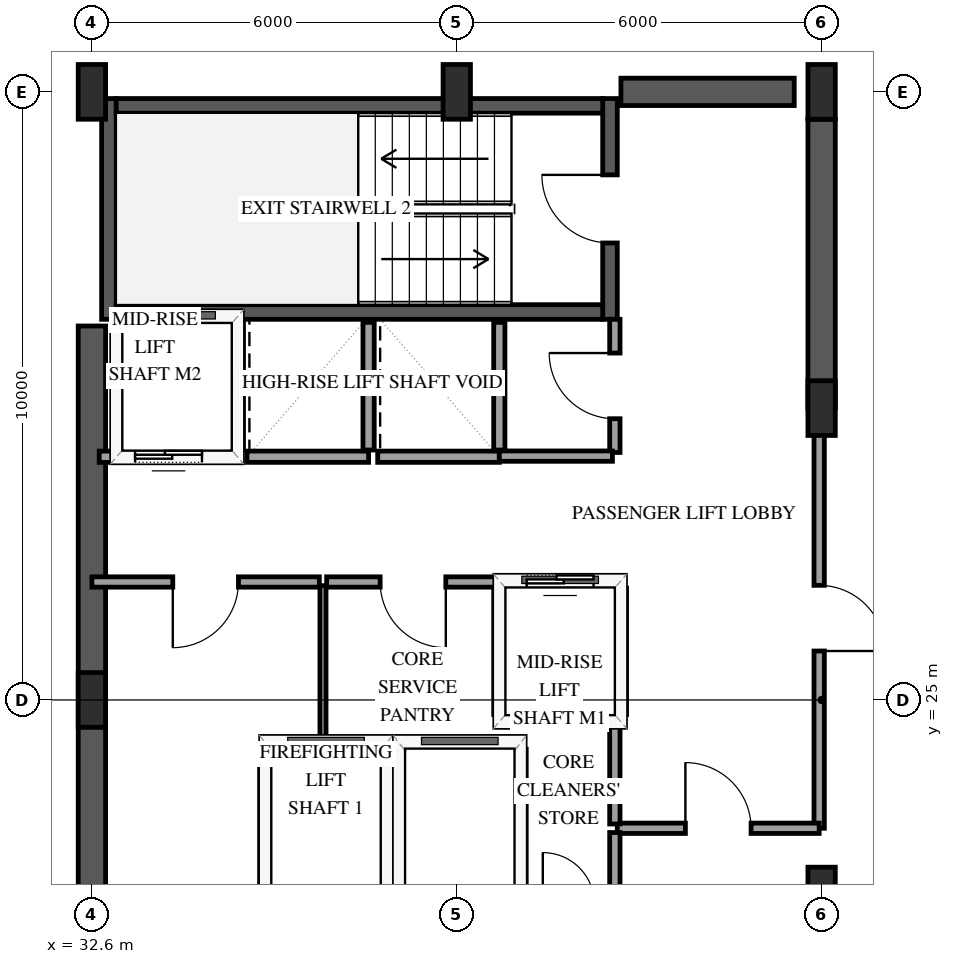
"""IFC4 building model, lengths in metres.
Left out: names, types, materials, properties, quantities, classifications, styles, units other than length and angle.
Written with IfcOpenShell. Run it as: python <this file> out.ifc"""

import sys

from ifc_helpers import new_model, si_unit, direction, frame, frame_2d, origin, origin_2d, place, context, subcontext, project, spatial, rectangle, extrude, element, fill, save


model = new_model("IFC4")
c1 = context("Model", 3, precision=1e-05, world=origin(), true_north=direction((0.0, 1.0)))
c2 = subcontext(c1, "Body", "Model", "MODEL_VIEW")
j1 = project(units=[si_unit("LENGTHUNIT", "METRE"), si_unit("PLANEANGLEUNIT", "RADIAN")], contexts=[c1])
p1 = place(None, origin())
s1 = spatial("IfcSite", under=j1, at=p1, CompositionType="ELEMENT")
p2 = place(p1, origin())
s2 = spatial("IfcBuilding", under=s1, at=p2, CompositionType="ELEMENT")
p3 = place(p2, frame((0.0, 0.0, 194.2)))
s3 = spatial("IfcBuildingStorey", under=s2, at=p3, CompositionType="ELEMENT", Elevation=194.2)
p4 = place(p3, frame((32.88, 31.26, 0.0), z_axis=(0.0, 0.0, 1.0), x_axis=(0.0, 1.0, 0.0)))
e1 = element("IfcWall", 1, at=p4, inside=s3, PredefinedType="SHEAR", context=c2, shape_type="SweptSolid", body=[
    extrude(rectangle(XDim=3.63, YDim=0.24, at=frame_2d((1.815, 0.0))), origin(), (0.0, 0.0, 1.0), 3.6),
])
p5 = place(p3, frame((41.12, 31.26, 0.0), z_axis=(0.0, 0.0, 1.0), x_axis=(0.0, 1.0, 0.0)))
e2 = element("IfcWall", 2, at=p5, inside=s3, PredefinedType="SHEAR", context=c2, shape_type="SweptSolid", body=[
    extrude(rectangle(XDim=3.63, YDim=0.24, at=frame_2d((1.815, 0.0))), origin(), (0.0, 0.0, 1.0), 3.6),
])
p6 = place(p5, frame((1.255, 0.0, 0.0)))
e3 = element("IfcOpeningElement", 3, at=p6, cuts=e2, PredefinedType="OPENING", context=c2, shape_type="SweptSolid", body=[
    extrude(rectangle(XDim=1.12, YDim=2.15, at=frame_2d((0.56, 1.075))), frame((0.0, 0.13, 0.0), z_axis=(0.0, -1.0, 0.0), x_axis=(1.0, 0.0, 0.0)), (0.0, 0.0, 1.0), 0.26),
])
for number, where, z_axis, x_axis in (
    (4, (33.0, 31.38, 0.0), (0.0, 0.0, 1.0), (1.0, 0.0, 0.0)),
    (5, (33.0, 34.77, 0.0), (0.0, 0.0, 1.0), (1.0, 0.0, 0.0)),
):
    element("IfcWall", number, at=place(p3, frame(where, z_axis=z_axis, x_axis=x_axis)), inside=s3, PredefinedType="SHEAR", context=c2, shape_type="SweptSolid", body=[
        extrude(rectangle(XDim=8.0, YDim=0.24, at=frame_2d((4.0, 0.0))), origin(), (0.0, 0.0, 1.0), 3.6),
    ])
p7 = place(p3, frame((32.6, 18.85, 0.0), z_axis=(0.0, 0.0, 1.0), x_axis=(0.0, 1.0, 0.0)))
e6 = element("IfcWall", 6, at=p7, inside=s3, PredefinedType="SHEAR", context=c2, shape_type="SweptSolid", body=[
    extrude(rectangle(XDim=12.3, YDim=0.45, at=frame_2d((6.15, 0.0))), origin(), (0.0, 0.0, 1.0), 3.6),
])
p8 = place(p3, frame((41.3, 35.0, 0.0), z_axis=(0.0, 0.0, 1.0), x_axis=(1.0, 0.0, 0.0)))
e7 = element("IfcWall", 7, at=p8, inside=s3, PredefinedType="SHEAR", context=c2, shape_type="SweptSolid", body=[
    extrude(rectangle(XDim=2.85, YDim=0.45, at=frame_2d((1.425, 0.0))), origin(), (0.0, 0.0, 1.0), 3.6),
])
p9 = place(p3, frame((44.6, 29.8, 0.0), z_axis=(0.0, 0.0, 1.0), x_axis=(0.0, 1.0, 0.0)))
e8 = element("IfcWall", 8, at=p9, inside=s3, PredefinedType="SHEAR", context=c2, shape_type="SweptSolid", body=[
    extrude(rectangle(XDim=4.75, YDim=0.45, at=frame_2d((2.375, 0.0))), origin(), (0.0, 0.0, 1.0), 3.6),
])
for number, where, z_axis, x_axis in (
    (9, (32.6, 25.0, 0.0), (0.0, 0.0, 1.0), (1.0, 0.0, 0.0)),
    (10, (32.6, 35.0, 0.0), (0.0, 0.0, 1.0), (1.0, 0.0, 0.0)),
    (11, (38.6, 35.0, 0.0), (0.0, 0.0, 1.0), (1.0, 0.0, 0.0)),
    (12, (44.6, 21.8, 0.0), (0.0, 0.0, 1.0), (1.0, 0.0, 0.0)),
    (13, (44.6, 29.8, 0.0), (0.0, 0.0, 1.0), (1.0, 0.0, 0.0)),
    (14, (44.6, 35.0, 0.0), (0.0, 0.0, 1.0), (1.0, 0.0, 0.0)),
):
    element("IfcColumn", number, at=place(p3, frame(where, z_axis=z_axis, x_axis=x_axis)), inside=s3, PredefinedType="PILASTER", context=c2, shape_type="SweptSolid", body=[
        extrude(rectangle(XDim=0.45, YDim=0.9, at=origin_2d()), origin(), (0.0, 0.0, 1.0), 3.6),
    ])
p10 = place(p3, frame((35.45, 24.3, 0.0), z_axis=(0.0, 0.0, 1.0), x_axis=(1.0, 0.0, 0.0)))
e15 = element("IfcWall", 15, at=p10, inside=s3, PredefinedType="SOLIDWALL", context=c2, shape_type="SweptSolid", body=[
    extrude(rectangle(XDim=2.0, YDim=0.185, at=frame_2d((1.0, 0.0))), origin(), (0.0, 0.0, 1.0), 3.3),
])
for number, where, z_axis, x_axis in (
    (16, (35.45, 21.81, 0.0), (0.0, 0.0, 1.0), (0.0, 1.0, 0.0)),
    (17, (37.45, 21.81, 0.0), (0.0, 0.0, 1.0), (0.0, 1.0, 0.0)),
):
    element("IfcWall", number, at=place(p3, frame(where, z_axis=z_axis, x_axis=x_axis)), inside=s3, PredefinedType="SOLIDWALL", context=c2, shape_type="SweptSolid", body=[
        extrude(rectangle(XDim=2.38, YDim=0.185, at=frame_2d((1.19, 0.0))), origin(), (0.0, 0.0, 1.0), 3.3),
    ])
p11 = place(p3, frame((37.65, 24.3, 0.0), z_axis=(0.0, 0.0, 1.0), x_axis=(1.0, 0.0, 0.0)))
e18 = element("IfcWall", 18, at=p11, inside=s3, PredefinedType="SOLIDWALL", context=c2, shape_type="SweptSolid", body=[
    extrude(rectangle(XDim=2.0, YDim=0.185, at=frame_2d((1.0, 0.0))), origin(), (0.0, 0.0, 1.0), 3.3),
])
p12 = place(p3, frame((39.65, 21.81, 0.0), z_axis=(0.0, 0.0, 1.0), x_axis=(0.0, 1.0, 0.0)))
e19 = element("IfcWall", 19, at=p12, inside=s3, PredefinedType="SOLIDWALL", context=c2, shape_type="SweptSolid", body=[
    extrude(rectangle(XDim=2.38, YDim=0.185, at=frame_2d((1.19, 0.0))), origin(), (0.0, 0.0, 1.0), 3.3),
])
p13 = place(p3, frame((39.3, 24.65, 0.0), z_axis=(0.0, 0.0, 1.0), x_axis=(1.0, 0.0, 0.0)))
e20 = element("IfcWall", 20, at=p13, inside=s3, PredefinedType="SOLIDWALL", context=c2, shape_type="SweptSolid", body=[
    extrude(rectangle(XDim=2.0, YDim=0.185, at=frame_2d((1.0, 0.0))), origin(), (0.0, 0.0, 1.0), 3.3),
])
p14 = place(p3, frame((39.3, 26.95, 0.0), z_axis=(0.0, 0.0, 1.0), x_axis=(1.0, 0.0, 0.0)))
e21 = element("IfcWall", 21, at=p14, inside=s3, PredefinedType="SOLIDWALL", context=c2, shape_type="SweptSolid", body=[
    extrude(rectangle(XDim=2.0, YDim=0.185, at=frame_2d((1.0, 0.0))), origin(), (0.0, 0.0, 1.0), 3.3),
])
p15 = place(p14, frame((0.45, 0.0, 0.0)))
e22 = element("IfcOpeningElement", 22, at=p15, cuts=e21, PredefinedType="OPENING", context=c2, shape_type="SweptSolid", body=[
    extrude(rectangle(XDim=1.1, YDim=2.15, at=frame_2d((0.55, 1.075))), frame((0.0, 0.103, 0.0), z_axis=(0.0, -1.0, 0.0), x_axis=(1.0, 0.0, 0.0)), (0.0, 0.0, 1.0), 0.205),
])
for number, where, z_axis, x_axis in (
    (23, (39.3, 24.76, 0.0), (0.0, 0.0, 1.0), (0.0, 1.0, 0.0)),
    (24, (41.3, 24.76, 0.0), (0.0, 0.0, 1.0), (0.0, 1.0, 0.0)),
):
    element("IfcWall", number, at=place(p3, frame(where, z_axis=z_axis, x_axis=x_axis)), inside=s3, PredefinedType="SOLIDWALL", context=c2, shape_type="SweptSolid", body=[
        extrude(rectangle(XDim=2.08, YDim=0.185, at=frame_2d((1.04, 0.0))), origin(), (0.0, 0.0, 1.0), 3.3),
    ])
p16 = place(p3, frame((32.72, 29.0, 0.0), z_axis=(0.0, 0.0, 1.0), x_axis=(1.0, 0.0, 0.0)))
e25 = element("IfcWall", 25, at=p16, inside=s3, PredefinedType="SOLIDWALL", context=c2, shape_type="SweptSolid", body=[
    extrude(rectangle(XDim=2.28, YDim=0.185, at=frame_2d((1.14, 0.0))), origin(), (0.0, 0.0, 1.0), 3.3),
])
p17 = place(p16, frame((0.59, 0.0, 0.0)))
e26 = element("IfcOpeningElement", 26, at=p17, cuts=e25, PredefinedType="OPENING", context=c2, shape_type="SweptSolid", body=[
    extrude(rectangle(XDim=1.1, YDim=2.15, at=frame_2d((0.55, 1.075))), frame((0.0, 0.103, 0.0), z_axis=(0.0, -1.0, 0.0), x_axis=(1.0, 0.0, 0.0)), (0.0, 0.0, 1.0), 0.205),
])
p18 = place(p3, frame((35.0, 29.11, 0.0), z_axis=(0.0, 0.0, 1.0), x_axis=(0.0, 1.0, 0.0)))
e27 = element("IfcWall", 27, at=p18, inside=s3, PredefinedType="SOLIDWALL", context=c2, shape_type="SweptSolid", body=[
    extrude(rectangle(XDim=2.1, YDim=0.185, at=frame_2d((1.05, 0.0))), origin(), (0.0, 0.0, 1.0), 3.3),
])
p19 = place(p3, frame((35.15, 29.0, 0.0), z_axis=(0.0, 0.0, 1.0), x_axis=(1.0, 0.0, 0.0)))
e28 = element("IfcWall", 28, at=p19, inside=s3, PredefinedType="SOLIDWALL", context=c2, shape_type="SweptSolid", body=[
    extrude(rectangle(XDim=2.0, YDim=0.185, at=frame_2d((1.0, 0.0))), origin(), (0.0, 0.0, 1.0), 3.3),
])
p20 = place(p3, frame((37.15, 29.11, 0.0), z_axis=(0.0, 0.0, 1.0), x_axis=(0.0, 1.0, 0.0)))
e29 = element("IfcWall", 29, at=p20, inside=s3, PredefinedType="SOLIDWALL", context=c2, shape_type="SweptSolid", body=[
    extrude(rectangle(XDim=2.1, YDim=0.185, at=frame_2d((1.05, 0.0))), origin(), (0.0, 0.0, 1.0), 3.3),
])
p21 = place(p3, frame((37.3, 29.0, 0.0), z_axis=(0.0, 0.0, 1.0), x_axis=(1.0, 0.0, 0.0)))
e30 = element("IfcWall", 30, at=p21, inside=s3, PredefinedType="SOLIDWALL", context=c2, shape_type="SweptSolid", body=[
    extrude(rectangle(XDim=2.0, YDim=0.185, at=frame_2d((1.0, 0.0))), origin(), (0.0, 0.0, 1.0), 3.3),
])
p22 = place(p3, frame((39.3, 29.11, 0.0), z_axis=(0.0, 0.0, 1.0), x_axis=(0.0, 1.0, 0.0)))
e31 = element("IfcWall", 31, at=p22, inside=s3, PredefinedType="SOLIDWALL", context=c2, shape_type="SweptSolid", body=[
    extrude(rectangle(XDim=2.1, YDim=0.185, at=frame_2d((1.05, 0.0))), origin(), (0.0, 0.0, 1.0), 3.3),
])
p23 = place(p3, frame((44.56, 29.8, 0.0), z_axis=(0.0, 0.0, 1.0), x_axis=(0.0, -1.0, 0.0)))
e32 = element("IfcWall", 32, at=p23, inside=s3, PredefinedType="PARTITIONING", context=c2, shape_type="SweptSolid", body=[
    extrude(rectangle(XDim=6.91, YDim=0.17, at=frame_2d((3.455, 0.0))), origin(), (0.0, 0.0, 1.0), 2.34),
])
p24 = place(p23, frame((2.915, 0.0, 0.0)))
e33 = element("IfcOpeningElement", 33, at=p24, cuts=e32, PredefinedType="OPENING", context=c2, shape_type="SweptSolid", body=[
    extrude(rectangle(XDim=1.08, YDim=2.15, at=frame_2d((0.54, 1.075))), frame((0.0, 0.095, 0.0), z_axis=(0.0, -1.0, 0.0), x_axis=(1.0, 0.0, 0.0)), (0.0, 0.0, 1.0), 0.19),
])
p25 = place(p3, frame((36.34, 26.94, 0.0), z_axis=(0.0, 0.0, 1.0), x_axis=(-1.0, 0.0, 0.0)))
e34 = element("IfcWall", 34, at=p25, inside=s3, PredefinedType="PARTITIONING", context=c2, shape_type="SweptSolid", body=[
    extrude(rectangle(XDim=3.74, YDim=0.17, at=frame_2d((1.87, 0.0))), origin(), (0.0, 0.0, 1.0), 3.3),
])
p26 = place(p25, frame((1.33, 0.0, 0.0)))
e35 = element("IfcOpeningElement", 35, at=p26, cuts=e34, PredefinedType="OPENING", context=c2, shape_type="SweptSolid", body=[
    extrude(rectangle(XDim=1.08, YDim=2.15, at=frame_2d((0.54, 1.075))), frame((0.0, 0.095, 0.0), z_axis=(0.0, -1.0, 0.0), x_axis=(1.0, 0.0, 0.0)), (0.0, 0.0, 1.0), 0.19),
])
p27 = place(p3, frame((41.24, 22.89, 0.0), z_axis=(0.0, 0.0, 1.0), x_axis=(1.0, 0.0, 0.0)))
e36 = element("IfcWall", 36, at=p27, inside=s3, PredefinedType="PARTITIONING", context=c2, shape_type="SweptSolid", body=[
    extrude(rectangle(XDim=3.32, YDim=0.17, at=frame_2d((1.66, 0.0))), origin(), (0.0, 0.0, 1.0), 3.3),
])
p28 = place(p27, frame((1.12, 0.0, 0.0)))
e37 = element("IfcOpeningElement", 37, at=p28, cuts=e36, PredefinedType="OPENING", context=c2, shape_type="SweptSolid", body=[
    extrude(rectangle(XDim=1.08, YDim=2.15, at=frame_2d((0.54, 1.075))), frame((0.0, 0.095, 0.0), z_axis=(0.0, -1.0, 0.0), x_axis=(1.0, 0.0, 0.0)), (0.0, 0.0, 1.0), 0.19),
])
p29 = place(p3, frame((39.3, 26.94, 0.0), z_axis=(0.0, 0.0, 1.0), x_axis=(-1.0, 0.0, 0.0)))
e38 = element("IfcWall", 38, at=p29, inside=s3, PredefinedType="PARTITIONING", context=c2, shape_type="SweptSolid", body=[
    extrude(rectangle(XDim=2.84, YDim=0.17, at=frame_2d((1.42, 0.0))), origin(), (0.0, 0.0, 1.0), 3.3),
])
p30 = place(p29, frame((0.88, 0.0, 0.0)))
e39 = element("IfcOpeningElement", 39, at=p30, cuts=e38, PredefinedType="OPENING", context=c2, shape_type="SweptSolid", body=[
    extrude(rectangle(XDim=1.08, YDim=2.15, at=frame_2d((0.54, 1.075))), frame((0.0, 0.095, 0.0), z_axis=(0.0, -1.0, 0.0), x_axis=(1.0, 0.0, 0.0)), (0.0, 0.0, 1.0), 0.19),
])
p31 = place(p3, frame((36.4, 26.88, 0.0), z_axis=(0.0, 0.0, 1.0), x_axis=(0.0, -1.0, 0.0)))
e40 = element("IfcWall", 40, at=p31, inside=s3, PredefinedType="PARTITIONING", context=c2, shape_type="SweptSolid", body=[
    extrude(rectangle(XDim=2.58, YDim=0.1, at=frame_2d((1.29, 0.0))), origin(), (0.0, 0.0, 1.0), 3.3),
])
p32 = place(p3, frame((41.2, 29.07, 0.0), z_axis=(0.0, 0.0, 1.0), x_axis=(0.0, 1.0, 0.0)))
e41 = element("IfcWall", 41, at=p32, inside=s3, PredefinedType="PARTITIONING", context=c2, shape_type="SweptSolid", body=[
    extrude(rectangle(XDim=2.19, YDim=0.17, at=frame_2d((1.095, 0.0))), origin(), (0.0, 0.0, 1.0), 3.3),
])
p33 = place(p32, frame((0.555, 0.0, 0.0)))
e42 = element("IfcOpeningElement", 42, at=p33, cuts=e41, PredefinedType="OPENING", context=c2, shape_type="SweptSolid", body=[
    extrude(rectangle(XDim=1.08, YDim=2.15, at=frame_2d((0.54, 1.075))), frame((0.0, 0.095, 0.0), z_axis=(0.0, -1.0, 0.0), x_axis=(1.0, 0.0, 0.0)), (0.0, 0.0, 1.0), 0.19),
])
p34 = place(p3, frame((39.3, 29.01, 0.0), z_axis=(0.0, 0.0, 1.0), x_axis=(1.0, 0.0, 0.0)))
e43 = element("IfcWall", 43, at=p34, inside=s3, PredefinedType="PARTITIONING", context=c2, shape_type="SweptSolid", body=[
    extrude(rectangle(XDim=1.86, YDim=0.17, at=frame_2d((0.93, 0.0))), origin(), (0.0, 0.0, 1.0), 3.3),
])
p35 = place(p3, frame((41.2, 22.96, 0.0), z_axis=(0.0, 0.0, 1.0), x_axis=(0.0, 1.0, 0.0)))
e44 = element("IfcWall", 44, at=p35, inside=s3, PredefinedType="PARTITIONING", context=c2, shape_type="SweptSolid", body=[
    extrude(rectangle(XDim=1.69, YDim=0.17, at=frame_2d((0.845, 0.0))), origin(), (0.0, 0.0, 1.0), 3.3),
])
p36 = place(p3, frame((41.2, 21.7, 0.0), z_axis=(0.0, 0.0, 1.0), x_axis=(0.0, 1.0, 0.0)))
e45 = element("IfcWall", 45, at=p36, inside=s3, PredefinedType="PARTITIONING", context=c2, shape_type="SweptSolid", body=[
    extrude(rectangle(XDim=1.12, YDim=0.17, at=frame_2d((0.56, 0.0))), origin(), (0.0, 0.0, 1.0), 3.3),
])
p37 = place(p15, origin())
e46 = element("IfcDoor", 46, at=p37, inside=s3, OperationType="SLIDING_TO_LEFT", PredefinedType="DOOR", context=c2, shape_type="SweptSolid", body=[
    extrude(rectangle(XDim=1.1, YDim=2.15, at=frame_2d((0.55, 1.075))), frame((0.0, 0.025, 0.0), z_axis=(0.0, -1.0, 0.0), x_axis=(1.0, 0.0, 0.0)), (0.0, 0.0, 1.0), 0.05),
])
fill(e22, e46)
p38 = place(p17, origin())
e47 = element("IfcDoor", 47, at=p38, inside=s3, OperationType="SLIDING_TO_LEFT", PredefinedType="DOOR", context=c2, shape_type="SweptSolid", body=[
    extrude(rectangle(XDim=1.1, YDim=2.15, at=frame_2d((0.55, 1.075))), frame((0.0, 0.025, 0.0), z_axis=(0.0, -1.0, 0.0), x_axis=(1.0, 0.0, 0.0)), (0.0, 0.0, 1.0), 0.05),
])
fill(e26, e47)
p39 = place(p6, origin())
e48 = element("IfcDoor", 48, at=p39, inside=s3, OperationType="SINGLE_SWING_RIGHT", PredefinedType="DOOR", context=c2, shape_type="SweptSolid", body=[
    extrude(rectangle(XDim=1.12, YDim=2.15, at=frame_2d((0.56, 1.075))), frame((0.0, 0.025, 0.0), z_axis=(0.0, -1.0, 0.0), x_axis=(1.0, 0.0, 0.0)), (0.0, 0.0, 1.0), 0.05),
])
fill(e3, e48)
p40 = place(p24, origin())
e49 = element("IfcDoor", 49, at=p40, inside=s3, OperationType="SINGLE_SWING_RIGHT", PredefinedType="DOOR", context=c2, shape_type="SweptSolid", body=[
    extrude(rectangle(XDim=1.08, YDim=2.15, at=frame_2d((0.54, 1.075))), frame((0.0, 0.025, 0.0), z_axis=(0.0, -1.0, 0.0), x_axis=(1.0, 0.0, 0.0)), (0.0, 0.0, 1.0), 0.05),
])
fill(e33, e49)
p41 = place(p26, origin())
e50 = element("IfcDoor", 50, at=p41, inside=s3, OperationType="SINGLE_SWING_RIGHT", PredefinedType="DOOR", context=c2, shape_type="SweptSolid", body=[
    extrude(rectangle(XDim=1.08, YDim=2.15, at=frame_2d((0.54, 1.075))), frame((0.0, 0.025, 0.0), z_axis=(0.0, -1.0, 0.0), x_axis=(1.0, 0.0, 0.0)), (0.0, 0.0, 1.0), 0.05),
])
fill(e35, e50)
p42 = place(p28, origin())
e51 = element("IfcDoor", 51, at=p42, inside=s3, OperationType="SINGLE_SWING_LEFT", PredefinedType="DOOR", context=c2, shape_type="SweptSolid", body=[
    extrude(rectangle(XDim=1.08, YDim=2.15, at=frame_2d((0.54, 1.075))), frame((0.0, 0.025, 0.0), z_axis=(0.0, -1.0, 0.0), x_axis=(1.0, 0.0, 0.0)), (0.0, 0.0, 1.0), 0.05),
])
fill(e37, e51)
p43 = place(p30, origin())
e52 = element("IfcDoor", 52, at=p43, inside=s3, OperationType="SINGLE_SWING_LEFT", PredefinedType="DOOR", context=c2, shape_type="SweptSolid", body=[
    extrude(rectangle(XDim=1.08, YDim=2.15, at=frame_2d((0.54, 1.075))), frame((0.0, 0.025, 0.0), z_axis=(0.0, -1.0, 0.0), x_axis=(1.0, 0.0, 0.0)), (0.0, 0.0, 1.0), 0.05),
])
fill(e39, e52)
p44 = place(p33, origin())
e53 = element("IfcDoor", 53, at=p44, inside=s3, OperationType="SINGLE_SWING_RIGHT", PredefinedType="DOOR", context=c2, shape_type="SweptSolid", body=[
    extrude(rectangle(XDim=1.08, YDim=2.15, at=frame_2d((0.54, 1.075))), frame((0.0, 0.025, 0.0), z_axis=(0.0, -1.0, 0.0), x_axis=(1.0, 0.0, 0.0)), (0.0, 0.0, 1.0), 0.05),
])
fill(e42, e53)
save(model, sys.argv[1])
